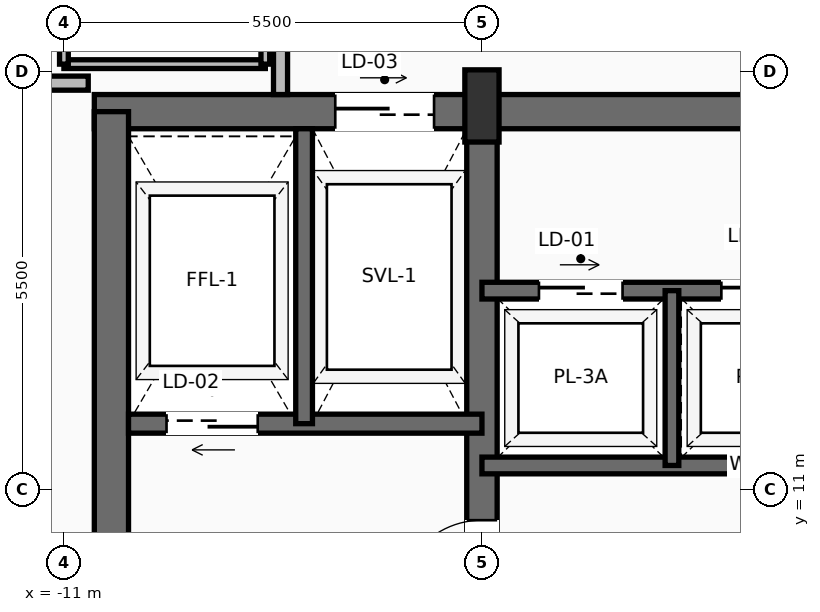
"""IFC4 building model, lengths in metres.
Left out: names, types, materials, properties, quantities, classifications, styles, units other than length and angle.
Written with IfcOpenShell. Run it as: python <this file> out.ifc"""

import sys

from ifc_helpers import new_model, si_unit, direction, frame, frame_2d, origin, origin_2d, place, context, subcontext, project, spatial, rectangle, extrude, source, transform, mapped, element, fill, save


model = new_model("IFC4")
c1 = context("Model", 3, precision=1e-05, world=origin(), true_north=direction((0.0, 1.0)))
c2 = subcontext(c1, "Body", "Model", "MODEL_VIEW")
j1 = project(units=[si_unit("LENGTHUNIT", "METRE"), si_unit("PLANEANGLEUNIT", "RADIAN")], contexts=[c1])
p1 = place(None, origin())
s1 = spatial("IfcSite", under=j1, at=p1, CompositionType="ELEMENT")
p2 = place(p1, origin())
s2 = spatial("IfcBuilding", under=s1, at=p2, CompositionType="ELEMENT")
p3 = place(p2, frame((0.0, 0.0, 300.6)))
s3 = spatial("IfcBuildingStorey", under=s2, at=p3, CompositionType="ELEMENT", Elevation=300.6)
p4 = place(p3, frame((-10.6, 15.975, 0.0), z_axis=(0.0, 0.0, 1.0), x_axis=(1.0, 0.0, 0.0)))
e1 = element("IfcWall", 1, at=p4, inside=s3, PredefinedType="SHEAR", context=c2, shape_type="SweptSolid", body=[
    extrude(rectangle(XDim=21.2, YDim=0.45, at=frame_2d((10.6, 0.0))), origin(), (0.0, 0.0, 1.0), 3.15),
])
p5 = place(p4, frame((3.17, 0.0, 0.0)))
e2 = element("IfcOpeningElement", 2, at=p5, cuts=e1, PredefinedType="OPENING", context=c2, shape_type="SweptSolid", body=[
    extrude(rectangle(XDim=1.3, YDim=2.3, at=frame_2d((0.65, 1.15))), frame((0.0, 0.235, 0.0), z_axis=(0.0, -1.0, 0.0), x_axis=(1.0, 0.0, 0.0)), (0.0, 0.0, 1.0), 0.47),
])
p6 = place(p4, frame((9.6, 0.0, 0.0)))
e3 = element("IfcOpeningElement", 3, at=p6, cuts=e1, PredefinedType="OPENING", context=c2, shape_type="SweptSolid", body=[
    extrude(rectangle(XDim=2.0, YDim=2.4, at=frame_2d((1.0, 1.2))), frame((0.0, 0.235, 0.0), z_axis=(0.0, -1.0, 0.0), x_axis=(1.0, 0.0, 0.0)), (0.0, 0.0, 1.0), 0.47),
])
p7 = place(p3, frame((-10.375, 0.625, 0.0), z_axis=(0.0, 0.0, 1.0), x_axis=(0.0, 1.0, 0.0)))
e4 = element("IfcWall", 4, at=p7, inside=s3, PredefinedType="SHEAR", context=c2, shape_type="SweptSolid", body=[
    extrude(rectangle(XDim=15.35, YDim=0.45, at=frame_2d((7.675, 0.0))), origin(), (0.0, 0.0, 1.0), 3.15),
])
p8 = place(p3, frame((-5.5, 0.625, 0.0), z_axis=(0.0, 0.0, 1.0), x_axis=(0.0, 1.0, 0.0)))
e5 = element("IfcWall", 5, at=p8, inside=s3, PredefinedType="SHEAR", context=c2, shape_type="SweptSolid", body=[
    extrude(rectangle(XDim=15.35, YDim=0.4, at=frame_2d((7.675, 0.0))), origin(), (0.0, 0.0, 1.0), 3.15),
])
p9 = place(p8, frame((8.875, 0.0, 0.0)))
e6 = element("IfcOpeningElement", 6, at=p9, cuts=e5, PredefinedType="OPENING", context=c2, shape_type="SweptSolid", body=[
    extrude(rectangle(XDim=1.1, YDim=2.2, at=frame_2d((0.55, 1.1))), frame((0.0, 0.21, 0.0), z_axis=(0.0, -1.0, 0.0), x_axis=(1.0, 0.0, 0.0)), (0.0, 0.0, 1.0), 0.42),
])
m1 = source(origin(), c2, "Body", "SweptSolid", [
    extrude(rectangle(XDim=0.45, YDim=0.95, at=origin_2d()), origin(), (0.0, 0.0, 1.0), 3.45),
])
p10 = place(p3, frame((-5.5, 16.05, 0.0), z_axis=(0.0, 0.0, 1.0), x_axis=(1.0, 0.0, 0.0)))
e7 = element("IfcColumn", 7, at=p10, inside=s3, PredefinedType="PILASTER", context=c2, shape_type="MappedRepresentation", body=[
    mapped(m1, transform((0.0, 0.0, 0.0), scale=1.0)),
])
p11 = place(p3, frame((-17.759, 13.683, 0.0), z_axis=(0.0, 0.0, 1.0), x_axis=(0.496660385715, 0.867944964419, 0.0)))
e8 = element("IfcWall", 8, at=p11, inside=s3, PredefinedType="SOLIDWALL", context=c2, shape_type="SweptSolid", body=[
    extrude(rectangle(XDim=20.417, YDim=0.28, at=frame_2d((10.208, 0.0))), origin(), (0.0, 0.0, 1.0), 2.73),
])
p12 = place(p11, frame((4.9, 0.0, 0.0)))
e9 = element("IfcOpeningElement", 9, at=p12, cuts=e8, PredefinedType="OPENING", context=c2, shape_type="SweptSolid", body=[
    extrude(rectangle(XDim=1.6, YDim=2.35, at=frame_2d((0.8, 1.175))), frame((0.0, 0.15, 0.0), z_axis=(0.0, -1.0, 0.0), x_axis=(1.0, 0.0, 0.0)), (0.0, 0.0, 1.0), 0.3),
])
p13 = place(p3, frame((-5.5, 11.87, 0.0), z_axis=(0.0, 0.0, 1.0), x_axis=(-1.0, 0.0, 0.0)))
e10 = element("IfcWall", 10, at=p13, inside=s3, PredefinedType="SOLIDWALL", context=c2, shape_type="SweptSolid", body=[
    extrude(rectangle(XDim=4.65, YDim=0.25, at=frame_2d((2.325, 0.0))), origin(), (0.0, 0.0, 1.0), 3.15),
])
p14 = place(p13, frame((2.95, 0.0, 0.0)))
e11 = element("IfcOpeningElement", 11, at=p14, cuts=e10, PredefinedType="OPENING", context=c2, shape_type="SweptSolid", body=[
    extrude(rectangle(XDim=1.2, YDim=2.25, at=frame_2d((0.6, 1.125))), frame((0.0, 0.135, 0.0), z_axis=(0.0, -1.0, 0.0), x_axis=(1.0, 0.0, 0.0)), (0.0, 0.0, 1.0), 0.27),
])
p15 = place(p3, frame((-7.84, 11.87, 0.0), z_axis=(0.0, 0.0, 1.0), x_axis=(0.0, 1.0, 0.0)))
e12 = element("IfcWall", 12, at=p15, inside=s3, PredefinedType="SOLIDWALL", context=c2, shape_type="SweptSolid", body=[
    extrude(rectangle(XDim=3.88, YDim=0.22, at=frame_2d((1.94, 0.0))), origin(), (0.0, 0.0, 1.0), 3.15),
])
p16 = place(p3, frame((-5.5, 11.32, 0.0), z_axis=(0.0, 0.0, 1.0), x_axis=(1.0, 0.0, 0.0)))
e13 = element("IfcWall", 13, at=p16, inside=s3, PredefinedType="SOLIDWALL", context=c2, shape_type="SweptSolid", body=[
    extrude(rectangle(XDim=7.32, YDim=0.22, at=frame_2d((3.66, 0.0))), origin(), (0.0, 0.0, 1.0), 3.15),
])
p17 = place(p3, frame((-5.5, 13.62, 0.0), z_axis=(0.0, 0.0, 1.0), x_axis=(1.0, 0.0, 0.0)))
e14 = element("IfcWall", 14, at=p17, inside=s3, PredefinedType="SOLIDWALL", context=c2, shape_type="SweptSolid", body=[
    extrude(rectangle(XDim=7.32, YDim=0.22, at=frame_2d((3.66, 0.0))), origin(), (0.0, 0.0, 1.0), 3.15),
])
p18 = place(p17, frame((0.75, 0.0, 0.0)))
e15 = element("IfcOpeningElement", 15, at=p18, cuts=e14, PredefinedType="OPENING", context=c2, shape_type="SweptSolid", body=[
    extrude(rectangle(XDim=1.1, YDim=2.2, at=frame_2d((0.55, 1.1))), frame((0.0, 0.12, 0.0), z_axis=(0.0, -1.0, 0.0), x_axis=(1.0, 0.0, 0.0)), (0.0, 0.0, 1.0), 0.24),
])
p19 = place(p17, frame((3.15, 0.0, 0.0)))
e16 = element("IfcOpeningElement", 16, at=p19, cuts=e14, PredefinedType="OPENING", context=c2, shape_type="SweptSolid", body=[
    extrude(rectangle(XDim=1.1, YDim=2.2, at=frame_2d((0.55, 1.1))), frame((0.0, 0.12, 0.0), z_axis=(0.0, -1.0, 0.0), x_axis=(1.0, 0.0, 0.0)), (0.0, 0.0, 1.0), 0.24),
])
p20 = place(p17, frame((5.55, 0.0, 0.0)))
e17 = element("IfcOpeningElement", 17, at=p20, cuts=e14, PredefinedType="OPENING", context=c2, shape_type="SweptSolid", body=[
    extrude(rectangle(XDim=1.1, YDim=2.2, at=frame_2d((0.55, 1.1))), frame((0.0, 0.12, 0.0), z_axis=(0.0, -1.0, 0.0), x_axis=(1.0, 0.0, 0.0)), (0.0, 0.0, 1.0), 0.24),
])
p21 = place(p3, frame((-3.0, 11.32, 0.0), z_axis=(0.0, 0.0, 1.0), x_axis=(0.0, 1.0, 0.0)))
e18 = element("IfcWall", 18, at=p21, inside=s3, PredefinedType="SOLIDWALL", context=c2, shape_type="SweptSolid", body=[
    extrude(rectangle(XDim=2.3, YDim=0.18, at=frame_2d((1.15, 0.0))), origin(), (0.0, 0.0, 1.0), 3.15),
])
p22 = place(p3, frame((-8.15, 16.2, 0.0), z_axis=(0.0, 0.0, 1.0), x_axis=(0.0, 1.0, 0.0)))
e19 = element("IfcWall", 19, at=p22, inside=s3, PredefinedType="PARTITIONING", context=c2, shape_type="SweptSolid", body=[
    extrude(rectangle(XDim=13.6, YDim=0.185, at=frame_2d((6.8, 0.0))), origin(), (0.0, 0.0, 1.0), 3.142),
])
p23 = place(p22, frame((3.235, 0.0, 0.0)))
e20 = element("IfcOpeningElement", 20, at=p23, cuts=e19, PredefinedType="OPENING", context=c2, shape_type="SweptSolid", body=[
    extrude(rectangle(XDim=1.05, YDim=2.25, at=frame_2d((0.525, 1.125))), frame((0.0, 0.103, 0.0), z_axis=(0.0, -1.0, 0.0), x_axis=(1.0, 0.0, 0.0)), (0.0, 0.0, 1.0), 0.205),
])
p24 = place(p22, frame((10.123, 0.0, 0.0)))
e21 = element("IfcOpeningElement", 21, at=p24, cuts=e19, PredefinedType="OPENING", context=c2, shape_type="SweptSolid", body=[
    extrude(rectangle(XDim=1.05, YDim=2.25, at=frame_2d((0.525, 1.125))), frame((0.0, 0.103, 0.0), z_axis=(0.0, -1.0, 0.0), x_axis=(1.0, 0.0, 0.0)), (0.0, 0.0, 1.0), 0.205),
])
p25 = place(p3, frame((-16.383, 16.35, 0.0), z_axis=(0.0, 0.0, 1.0), x_axis=(1.0, 0.0, 0.0)))
e22 = element("IfcWall", 22, at=p25, inside=s3, PredefinedType="PARTITIONING", context=c2, shape_type="SweptSolid", body=[
    extrude(rectangle(XDim=5.703, YDim=0.185, at=frame_2d((2.852, 0.0))), origin(), (0.0, 0.0, 1.0), 3.142),
])
p26 = place(p25, frame((3.08, 0.0, 0.0)))
e23 = element("IfcOpeningElement", 23, at=p26, cuts=e22, PredefinedType="OPENING", context=c2, shape_type="SweptSolid", body=[
    extrude(rectangle(XDim=1.05, YDim=2.25, at=frame_2d((0.525, 1.125))), frame((0.0, 0.103, 0.0), z_axis=(0.0, -1.0, 0.0), x_axis=(1.0, 0.0, 0.0)), (0.0, 0.0, 1.0), 0.205),
])
p27 = place(p3, frame((-11.0, 16.6, 0.0), z_axis=(0.0, 0.0, 1.0), x_axis=(1.0, 0.0, 0.0)))
e24 = element("IfcWall", 24, at=p27, inside=s3, PredefinedType="PARTITIONING", context=c2, shape_type="SweptSolid", body=[
    extrude(rectangle(XDim=2.65, YDim=0.115, at=frame_2d((1.325, 0.0))), origin(), (0.0, 0.0, 1.0), 3.142),
])
p28 = place(p3, frame((-11.0, 16.6, 0.0), z_axis=(0.0, 0.0, 1.0), x_axis=(0.0, 1.0, 0.0)))
e25 = element("IfcWall", 25, at=p28, inside=s3, PredefinedType="PARTITIONING", context=c2, shape_type="SweptSolid", body=[
    extrude(rectangle(XDim=2.4, YDim=0.115, at=frame_2d((1.2, 0.0))), origin(), (0.0, 0.0, 1.0), 3.142),
])
p29 = place(p28, frame((0.75, 0.0, 0.0)))
e26 = element("IfcOpeningElement", 26, at=p29, cuts=e25, PredefinedType="OPENING", context=c2, shape_type="SweptSolid", body=[
    extrude(rectangle(XDim=0.9, YDim=2.15, at=frame_2d((0.45, 1.075))), frame((0.0, 0.067, 0.0), z_axis=(0.0, -1.0, 0.0), x_axis=(1.0, 0.0, 0.0)), (0.0, 0.0, 1.0), 0.135),
])
p30 = place(p3, frame((-8.35, 16.6, 0.0), z_axis=(0.0, 0.0, 1.0), x_axis=(0.0, 1.0, 0.0)))
e27 = element("IfcWall", 27, at=p30, inside=s3, PredefinedType="PARTITIONING", context=c2, shape_type="SweptSolid", body=[
    extrude(rectangle(XDim=2.4, YDim=0.115, at=frame_2d((1.2, 0.0))), origin(), (0.0, 0.0, 1.0), 3.142),
])
m2 = source(origin(), c2, "Body", "SweptSolid", [
    extrude(rectangle(XDim=1.1, YDim=2.2, at=frame_2d((0.55, 1.1))), frame((0.0, 0.025, 0.0), z_axis=(0.0, -1.0, 0.0), x_axis=(1.0, 0.0, 0.0)), (0.0, 0.0, 1.0), 0.05),
])
p31 = place(p9, origin())
e28 = element("IfcDoor", 28, at=p31, inside=s3, OperationType="SINGLE_SWING_LEFT", PredefinedType="DOOR", context=c2, shape_type="MappedRepresentation", body=[
    mapped(m2, transform((0.0, 0.0, 0.0), scale=1.0)),
])
fill(e6, e28)
m3 = source(origin(), c2, "Body", "SweptSolid", [
    extrude(rectangle(XDim=1.2, YDim=2.25, at=frame_2d((0.6, 1.125))), frame((0.0, 0.025, 0.0), z_axis=(0.0, -1.0, 0.0), x_axis=(1.0, 0.0, 0.0)), (0.0, 0.0, 1.0), 0.05),
])
p32 = place(p14, origin())
e29 = element("IfcDoor", 29, at=p32, inside=s3, OperationType="SLIDING_TO_LEFT", PredefinedType="DOOR", context=c2, shape_type="MappedRepresentation", body=[
    mapped(m3, transform((0.0, 0.0, 0.0), scale=1.0)),
])
fill(e11, e29)
m4 = source(origin(), c2, "Body", "SweptSolid", [
    extrude(rectangle(XDim=1.3, YDim=2.3, at=frame_2d((0.65, 1.15))), frame((0.0, 0.025, 0.0), z_axis=(0.0, -1.0, 0.0), x_axis=(1.0, 0.0, 0.0)), (0.0, 0.0, 1.0), 0.05),
])
p33 = place(p5, origin())
e30 = element("IfcDoor", 30, at=p33, inside=s3, OperationType="SLIDING_TO_RIGHT", PredefinedType="DOOR", context=c2, shape_type="MappedRepresentation", body=[
    mapped(m4, transform((0.0, 0.0, 0.0), scale=1.0)),
])
fill(e2, e30)
m5 = source(origin(), c2, "Body", "SweptSolid", [
    extrude(rectangle(XDim=1.1, YDim=2.2, at=frame_2d((0.55, 1.1))), frame((0.0, 0.025, 0.0), z_axis=(0.0, -1.0, 0.0), x_axis=(1.0, 0.0, 0.0)), (0.0, 0.0, 1.0), 0.05),
])
p34 = place(p18, origin())
e31 = element("IfcDoor", 31, at=p34, inside=s3, OperationType="SLIDING_TO_RIGHT", PredefinedType="DOOR", context=c2, shape_type="MappedRepresentation", body=[
    mapped(m5, transform((0.0, 0.0, 0.0), scale=1.0)),
])
fill(e15, e31)
p35 = place(p19, origin())
e32 = element("IfcDoor", 32, at=p35, inside=s3, OperationType="SLIDING_TO_RIGHT", PredefinedType="DOOR", context=c2, shape_type="MappedRepresentation", body=[
    mapped(m5, transform((0.0, 0.0, 0.0), scale=1.0)),
])
fill(e16, e32)
save(model, sys.argv[1])
